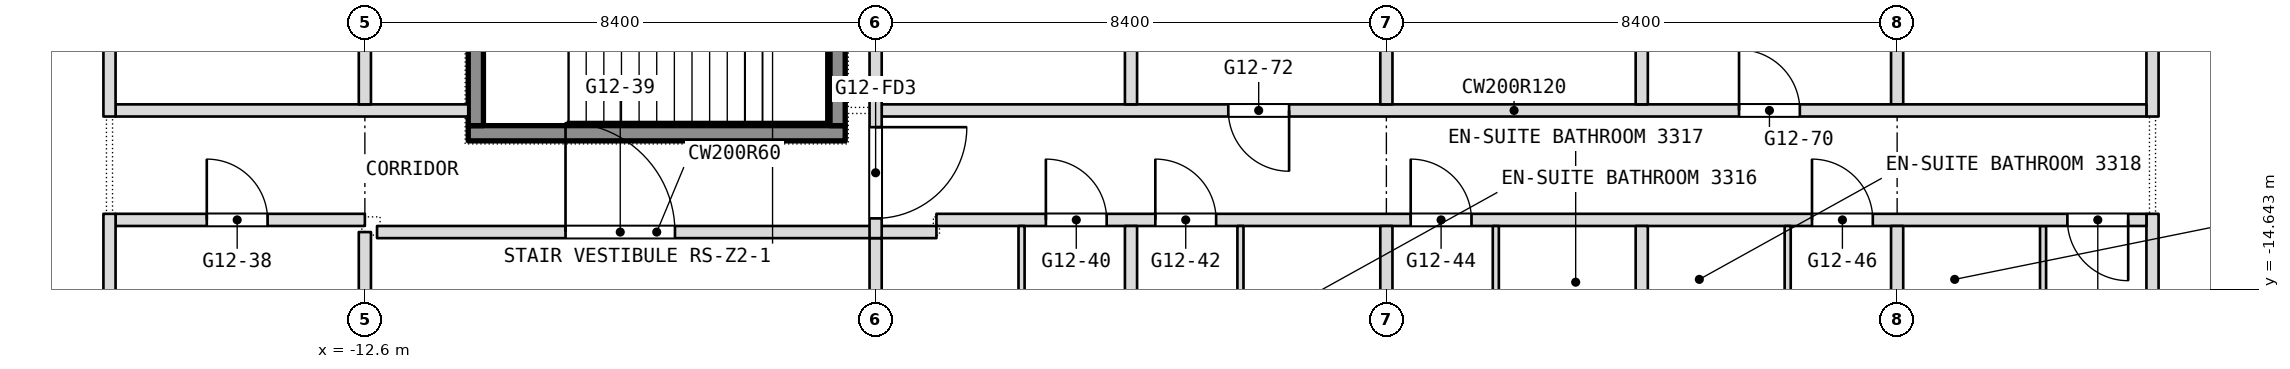
"""IFC4 building model, lengths in metres.
Left out: names, types, materials, properties, quantities, classifications, styles, units other than length and angle.
Written with IfcOpenShell. Run it as: python <this file> out.ifc"""

import sys

from ifc_helpers import new_model, si_unit, direction, frame, frame_2d, origin, place, context, subcontext, project, spatial, rectangle, extrude, element, fill, save


model = new_model("IFC4")
c1 = context("Model", 3, precision=1e-05, world=origin(), true_north=direction((0.0, 1.0)))
c2 = subcontext(c1, "Body", "Model", "MODEL_VIEW")
j1 = project(units=[si_unit("LENGTHUNIT", "METRE"), si_unit("PLANEANGLEUNIT", "RADIAN")], contexts=[c1])
p1 = place(None, origin())
s1 = spatial("IfcSite", under=j1, at=p1, CompositionType="ELEMENT")
p2 = place(p1, origin())
s2 = spatial("IfcBuilding", under=s1, at=p2, CompositionType="ELEMENT")
p3 = place(p2, frame((0.0, 0.0, 144.5)))
s3 = spatial("IfcBuildingStorey", under=s2, at=p3, CompositionType="ELEMENT", Elevation=144.5)
p4 = place(p3, frame((16.8, -22.186, 0.0), z_axis=(0.0, 0.0, 1.0), x_axis=(0.0, 1.0, 0.0)))
e1 = element("IfcWall", 1, at=p4, inside=s3, PredefinedType="PARTITIONING", context=c2, shape_type="SweptSolid", body=[
    extrude(rectangle(XDim=8.786, YDim=0.2, at=frame_2d((4.393, 0.0))), origin(), (0.0, 0.0, 1.0), 3.34),
])
p5 = place(p3, frame((16.8, -11.8, 0.0), z_axis=(0.0, 0.0, 1.0), x_axis=(0.0, 1.0, 0.0)))
e2 = element("IfcWall", 2, at=p5, inside=s3, PredefinedType="PARTITIONING", context=c2, shape_type="SweptSolid", body=[
    extrude(rectangle(XDim=9.9, YDim=0.2, at=frame_2d((4.95, 0.0))), origin(), (0.0, 0.0, 1.0), 3.34),
])
p6 = place(p3, frame((15.0, -16.25, 0.0), z_axis=(0.0, 0.0, 1.0), x_axis=(0.0, 1.0, 0.0)))
e3 = element("IfcWall", 3, at=p6, inside=s3, PredefinedType="PARTITIONING", context=c2, shape_type="SweptSolid", body=[
    extrude(rectangle(XDim=2.65, YDim=0.1, at=frame_2d((1.325, 0.0))), origin(), (0.0, 0.0, 1.0), 3.34),
])
p7 = place(p3, frame((-12.4, -13.7, 0.0), z_axis=(0.0, 0.0, 1.0), x_axis=(1.0, 0.0, 0.0)))
e4 = element("IfcWall", 4, at=p7, inside=s3, PredefinedType="PARTITIONING", context=c2, shape_type="SweptSolid", body=[
    extrude(rectangle(XDim=9.2, YDim=0.2, at=frame_2d((4.6, 0.0))), origin(), (0.0, 0.0, 1.0), 3.34),
])
p8 = place(p7, frame((3.1, 0.0, 0.0)))
e5 = element("IfcOpeningElement", 5, at=p8, cuts=e4, PredefinedType="OPENING", context=c2, shape_type="SweptSolid", body=[
    extrude(rectangle(XDim=1.8, YDim=2.1, at=frame_2d((0.9, 1.05))), frame((0.0, 0.1, 0.0), z_axis=(0.0, -1.0, 0.0), x_axis=(1.0, 0.0, 0.0)), (0.0, 0.0, 1.0), 0.2),
])
p9 = place(p3, frame((-16.7, -13.5, 0.0), z_axis=(0.0, 0.0, 1.0), x_axis=(1.0, 0.0, 0.0)))
e6 = element("IfcWall", 6, at=p9, inside=s3, PredefinedType="PARTITIONING", context=c2, shape_type="SweptSolid", body=[
    extrude(rectangle(XDim=4.1, YDim=0.2, at=frame_2d((2.05, 0.0))), origin(), (0.0, 0.0, 1.0), 3.34),
])
p10 = place(p9, frame((1.5, 0.0, 0.0)))
e7 = element("IfcOpeningElement", 7, at=p10, cuts=e6, PredefinedType="OPENING", context=c2, shape_type="SweptSolid", body=[
    extrude(rectangle(XDim=1.0, YDim=2.1, at=frame_2d((0.5, 1.05))), frame((0.0, 0.1, 0.0), z_axis=(0.0, -1.0, 0.0), x_axis=(1.0, 0.0, 0.0)), (0.0, 0.0, 1.0), 0.2),
])
p11 = place(p3, frame((-3.2, -13.5, 0.0), z_axis=(0.0, 0.0, 1.0), x_axis=(1.0, 0.0, 0.0)))
e8 = element("IfcWall", 8, at=p11, inside=s3, PredefinedType="PARTITIONING", context=c2, shape_type="SweptSolid", body=[
    extrude(rectangle(XDim=19.9, YDim=0.2, at=frame_2d((9.95, 0.0))), origin(), (0.0, 0.0, 1.0), 3.34),
])
p12 = place(p11, frame((1.8, 0.0, 0.0)))
e9 = element("IfcOpeningElement", 9, at=p12, cuts=e8, PredefinedType="OPENING", context=c2, shape_type="SweptSolid", body=[
    extrude(rectangle(XDim=1.0, YDim=2.1, at=frame_2d((0.5, 1.05))), frame((0.0, 0.1, 0.0), z_axis=(0.0, -1.0, 0.0), x_axis=(1.0, 0.0, 0.0)), (0.0, 0.0, 1.0), 0.2),
])
p13 = place(p11, frame((3.6, 0.0, 0.0)))
e10 = element("IfcOpeningElement", 10, at=p13, cuts=e8, PredefinedType="OPENING", context=c2, shape_type="SweptSolid", body=[
    extrude(rectangle(XDim=1.0, YDim=2.1, at=frame_2d((0.5, 1.05))), frame((0.0, 0.1, 0.0), z_axis=(0.0, -1.0, 0.0), x_axis=(1.0, 0.0, 0.0)), (0.0, 0.0, 1.0), 0.2),
])
p14 = place(p11, frame((7.8, 0.0, 0.0)))
e11 = element("IfcOpeningElement", 11, at=p14, cuts=e8, PredefinedType="OPENING", context=c2, shape_type="SweptSolid", body=[
    extrude(rectangle(XDim=1.0, YDim=2.1, at=frame_2d((0.5, 1.05))), frame((0.0, 0.1, 0.0), z_axis=(0.0, -1.0, 0.0), x_axis=(1.0, 0.0, 0.0)), (0.0, 0.0, 1.0), 0.2),
])
p15 = place(p11, frame((14.4, 0.0, 0.0)))
e12 = element("IfcOpeningElement", 12, at=p15, cuts=e8, PredefinedType="OPENING", context=c2, shape_type="SweptSolid", body=[
    extrude(rectangle(XDim=1.0, YDim=2.1, at=frame_2d((0.5, 1.05))), frame((0.0, 0.1, 0.0), z_axis=(0.0, -1.0, 0.0), x_axis=(1.0, 0.0, 0.0)), (0.0, 0.0, 1.0), 0.2),
])
p16 = place(p11, frame((18.6, 0.0, 0.0)))
e13 = element("IfcOpeningElement", 13, at=p16, cuts=e8, PredefinedType="OPENING", context=c2, shape_type="SweptSolid", body=[
    extrude(rectangle(XDim=1.0, YDim=2.1, at=frame_2d((0.5, 1.05))), frame((0.0, 0.1, 0.0), z_axis=(0.0, -1.0, 0.0), x_axis=(1.0, 0.0, 0.0)), (0.0, 0.0, 1.0), 0.2),
])
p17 = place(p3, frame((12.6, -21.175, 0.0), z_axis=(0.0, 0.0, 1.0), x_axis=(0.0, 1.0, 0.0)))
e14 = element("IfcWall", 14, at=p17, inside=s3, PredefinedType="PARTITIONING", context=c2, shape_type="SweptSolid", body=[
    extrude(rectangle(XDim=7.575, YDim=0.2, at=frame_2d((3.788, 0.0))), origin(), (0.0, 0.0, 1.0), 3.34),
])
p18 = place(p3, frame((12.6, -11.6, 0.0), z_axis=(0.0, 0.0, 1.0), x_axis=(0.0, 1.0, 0.0)))
e15 = element("IfcWall", 15, at=p18, inside=s3, PredefinedType="PARTITIONING", context=c2, shape_type="SweptSolid", body=[
    extrude(rectangle(XDim=3.9, YDim=0.2, at=frame_2d((1.95, 0.0))), origin(), (0.0, 0.0, 1.0), 3.34),
])
p19 = place(p3, frame((-16.7, -11.7, 0.0), z_axis=(0.0, 0.0, 1.0), x_axis=(1.0, 0.0, 0.0)))
e16 = element("IfcWall", 16, at=p19, inside=s3, PredefinedType="PARTITIONING", context=c2, shape_type="SweptSolid", body=[
    extrude(rectangle(XDim=5.8, YDim=0.2, at=frame_2d((2.9, 0.0))), origin(), (0.0, 0.0, 1.0), 3.34),
])
p20 = place(p3, frame((-4.1, -11.7, 0.0), z_axis=(0.0, 0.0, 1.0), x_axis=(1.0, 0.0, 0.0)))
e17 = element("IfcWall", 17, at=p20, inside=s3, PredefinedType="PARTITIONING", context=c2, shape_type="SweptSolid", body=[
    extrude(rectangle(XDim=20.8, YDim=0.2, at=frame_2d((10.4, 0.0))), origin(), (0.0, 0.0, 1.0), 3.34),
])
p21 = place(p20, frame((14.1, 0.0, 0.0)))
e18 = element("IfcOpeningElement", 18, at=p21, cuts=e17, PredefinedType="OPENING", context=c2, shape_type="SweptSolid", body=[
    extrude(rectangle(XDim=1.0, YDim=2.1, at=frame_2d((0.5, 1.05))), frame((0.0, 0.1, 0.0), z_axis=(0.0, -1.0, 0.0), x_axis=(1.0, 0.0, 0.0)), (0.0, 0.0, 1.0), 0.2),
])
p22 = place(p20, frame((5.7, 0.0, 0.0)))
e19 = element("IfcOpeningElement", 19, at=p22, cuts=e17, PredefinedType="OPENING", context=c2, shape_type="SweptSolid", body=[
    extrude(rectangle(XDim=1.0, YDim=2.1, at=frame_2d((0.5, 1.05))), frame((0.0, 0.1, 0.0), z_axis=(0.0, -1.0, 0.0), x_axis=(1.0, 0.0, 0.0)), (0.0, 0.0, 1.0), 0.2),
])
p23 = place(p3, frame((10.8, -16.25, 0.0), z_axis=(0.0, 0.0, 1.0), x_axis=(0.0, 1.0, 0.0)))
e20 = element("IfcWall", 20, at=p23, inside=s3, PredefinedType="PARTITIONING", context=c2, shape_type="SweptSolid", body=[
    extrude(rectangle(XDim=2.65, YDim=0.1, at=frame_2d((1.325, 0.0))), origin(), (0.0, 0.0, 1.0), 3.34),
])
p24 = place(p3, frame((8.4, -23.3, 0.0), z_axis=(0.0, 0.0, 1.0), x_axis=(0.0, 1.0, 0.0)))
e21 = element("IfcWall", 21, at=p24, inside=s3, PredefinedType="PARTITIONING", context=c2, shape_type="SweptSolid", body=[
    extrude(rectangle(XDim=9.7, YDim=0.2, at=frame_2d((4.85, 0.0))), origin(), (0.0, 0.0, 1.0), 3.34),
])
p25 = place(p3, frame((8.4, -11.6, 0.0), z_axis=(0.0, 0.0, 1.0), x_axis=(0.0, 1.0, 0.0)))
e22 = element("IfcWall", 22, at=p25, inside=s3, PredefinedType="PARTITIONING", context=c2, shape_type="SweptSolid", body=[
    extrude(rectangle(XDim=3.8, YDim=0.2, at=frame_2d((1.9, 0.0))), origin(), (0.0, 0.0, 1.0), 3.34),
])
p26 = place(p3, frame((6.0, -16.55, 0.0), z_axis=(0.0, 0.0, 1.0), x_axis=(0.0, 1.0, 0.0)))
e23 = element("IfcWall", 23, at=p26, inside=s3, PredefinedType="PARTITIONING", context=c2, shape_type="SweptSolid", body=[
    extrude(rectangle(XDim=2.95, YDim=0.1, at=frame_2d((1.475, 0.0))), origin(), (0.0, 0.0, 1.0), 3.34),
])
p27 = place(p3, frame((4.2, -23.3, 0.0), z_axis=(0.0, 0.0, 1.0), x_axis=(0.0, 1.0, 0.0)))
e24 = element("IfcWall", 24, at=p27, inside=s3, PredefinedType="PARTITIONING", context=c2, shape_type="SweptSolid", body=[
    extrude(rectangle(XDim=9.7, YDim=0.2, at=frame_2d((4.85, 0.0))), origin(), (0.0, 0.0, 1.0), 3.34),
])
p28 = place(p3, frame((4.2, -11.6, 0.0), z_axis=(0.0, 0.0, 1.0), x_axis=(0.0, 1.0, 0.0)))
e25 = element("IfcWall", 25, at=p28, inside=s3, PredefinedType="PARTITIONING", context=c2, shape_type="SweptSolid", body=[
    extrude(rectangle(XDim=9.7, YDim=0.2, at=frame_2d((4.85, 0.0))), origin(), (0.0, 0.0, 1.0), 3.34),
])
p29 = place(p3, frame((1.8, -16.95, 0.0), z_axis=(0.0, 0.0, 1.0), x_axis=(0.0, 1.0, 0.0)))
e26 = element("IfcWall", 26, at=p29, inside=s3, PredefinedType="PARTITIONING", context=c2, shape_type="SweptSolid", body=[
    extrude(rectangle(XDim=3.35, YDim=0.1, at=frame_2d((1.675, 0.0))), origin(), (0.0, 0.0, 1.0), 3.34),
])
p30 = place(p3, frame((0.0, -23.3, 0.0), z_axis=(0.0, 0.0, 1.0), x_axis=(0.0, 1.0, 0.0)))
e27 = element("IfcWall", 27, at=p30, inside=s3, PredefinedType="PARTITIONING", context=c2, shape_type="SweptSolid", body=[
    extrude(rectangle(XDim=9.7, YDim=0.2, at=frame_2d((4.85, 0.0))), origin(), (0.0, 0.0, 1.0), 3.34),
])
p31 = place(p3, frame((0.0, -11.6, 0.0), z_axis=(0.0, 0.0, 1.0), x_axis=(0.0, 1.0, 0.0)))
e28 = element("IfcWall", 28, at=p31, inside=s3, PredefinedType="PARTITIONING", context=c2, shape_type="SweptSolid", body=[
    extrude(rectangle(XDim=9.7, YDim=0.2, at=frame_2d((4.85, 0.0))), origin(), (0.0, 0.0, 1.0), 3.34),
])
p32 = place(p3, frame((-1.8, -17.65, 0.0), z_axis=(0.0, 0.0, 1.0), x_axis=(0.0, 1.0, 0.0)))
e29 = element("IfcWall", 29, at=p32, inside=s3, PredefinedType="PARTITIONING", context=c2, shape_type="SweptSolid", body=[
    extrude(rectangle(XDim=4.05, YDim=0.1, at=frame_2d((2.025, 0.0))), origin(), (0.0, 0.0, 1.0), 3.34),
])
p33 = place(p3, frame((-4.2, -23.3, 0.0), z_axis=(0.0, 0.0, 1.0), x_axis=(0.0, 1.0, 0.0)))
e30 = element("IfcWall", 30, at=p33, inside=s3, PredefinedType="PARTITIONING", context=c2, shape_type="SweptSolid", body=[
    extrude(rectangle(XDim=9.5, YDim=0.2, at=frame_2d((4.75, 0.0))), origin(), (0.0, 0.0, 1.0), 3.34),
])
p34 = place(p3, frame((-4.2, -13.8, 0.0), z_axis=(0.0, 0.0, 1.0), x_axis=(0.0, 1.0, 0.0)))
e31 = element("IfcWall", 31, at=p34, inside=s3, PredefinedType="PARTITIONING", context=c2, shape_type="SweptSolid", body=[
    extrude(rectangle(XDim=13.8, YDim=0.2, at=frame_2d((6.9, 0.0))), origin(), (0.0, 0.0, 1.0), 3.34),
])
p35 = place(p34, frame((12.15, 0.0, 0.0)))
e32 = element("IfcOpeningElement", 32, at=p35, cuts=e31, PredefinedType="OPENING", context=c2, shape_type="SweptSolid", body=[
    extrude(rectangle(XDim=1.5, YDim=2.1, at=frame_2d((0.75, 1.05))), frame((0.0, 0.1, 0.0), z_axis=(0.0, -1.0, 0.0), x_axis=(1.0, 0.0, 0.0)), (0.0, 0.0, 1.0), 0.2),
])
p36 = place(p34, frame((0.325, 0.0, 0.0)))
e33 = element("IfcOpeningElement", 33, at=p36, cuts=e31, PredefinedType="OPENING", context=c2, shape_type="SweptSolid", body=[
    extrude(rectangle(XDim=1.5, YDim=2.1, at=frame_2d((0.75, 1.05))), frame((0.0, 0.1, 0.0), z_axis=(0.0, -1.0, 0.0), x_axis=(1.0, 0.0, 0.0)), (0.0, 0.0, 1.0), 0.2),
])
p37 = place(p3, frame((-12.6, -21.175, 0.0), z_axis=(0.0, 0.0, 1.0), x_axis=(0.0, 1.0, 0.0)))
e34 = element("IfcWall", 34, at=p37, inside=s3, PredefinedType="PARTITIONING", context=c2, shape_type="SweptSolid", body=[
    extrude(rectangle(XDim=7.475, YDim=0.2, at=frame_2d((3.738, 0.0))), origin(), (0.0, 0.0, 1.0), 3.34),
])
p38 = place(p3, frame((-12.6, -11.6, 0.0), z_axis=(0.0, 0.0, 1.0), x_axis=(0.0, 1.0, 0.0)))
e35 = element("IfcWall", 35, at=p38, inside=s3, PredefinedType="PARTITIONING", context=c2, shape_type="SweptSolid", body=[
    extrude(rectangle(XDim=9.7, YDim=0.2, at=frame_2d((4.85, 0.0))), origin(), (0.0, 0.0, 1.0), 3.34),
])
p39 = place(p3, frame((-16.8, -22.186, 0.0), z_axis=(0.0, 0.0, 1.0), x_axis=(0.0, 1.0, 0.0)))
e36 = element("IfcWall", 36, at=p39, inside=s3, PredefinedType="PARTITIONING", context=c2, shape_type="SweptSolid", body=[
    extrude(rectangle(XDim=8.786, YDim=0.2, at=frame_2d((4.393, 0.0))), origin(), (0.0, 0.0, 1.0), 3.34),
])
p40 = place(p3, frame((-16.8, -11.8, 0.0), z_axis=(0.0, 0.0, 1.0), x_axis=(0.0, 1.0, 0.0)))
e37 = element("IfcWall", 37, at=p40, inside=s3, PredefinedType="PARTITIONING", context=c2, shape_type="SweptSolid", body=[
    extrude(rectangle(XDim=9.9, YDim=0.2, at=frame_2d((4.95, 0.0))), origin(), (0.0, 0.0, 1.0), 3.34),
])
p41 = place(p3, frame((-10.9, -12.075, 0.1), z_axis=(0.0, 0.0, 1.0), x_axis=(1.0, 0.0, 0.0)))
e38 = element("IfcWall", 38, at=p41, inside=s3, PredefinedType="SHEAR", context=c2, shape_type="SweptSolid", body=[
    extrude(rectangle(XDim=6.2, YDim=0.25, at=frame_2d((3.1, 0.0))), origin(), (0.0, 0.0, 1.0), 3.6),
])
for number, where, z_axis, x_axis in (
    (39, (-10.775, -11.95, 0.1), (0.0, 0.0, 1.0), (0.0, 1.0, 0.0)),
    (40, (-4.825, -11.95, 0.1), (0.0, 0.0, 1.0), (0.0, 1.0, 0.0)),
):
    element("IfcWall", number, at=place(p3, frame(where, z_axis=z_axis, x_axis=x_axis)), inside=s3, PredefinedType="SHEAR", context=c2, shape_type="SweptSolid", body=[
        extrude(rectangle(XDim=2.9, YDim=0.25, at=frame_2d((1.45, 0.0))), origin(), (0.0, 0.0, 1.0), 3.6),
    ])
p42 = place(p8, origin())
e41 = element("IfcDoor", 41, at=p42, inside=s3, OperationType="DOUBLE_DOOR_SINGLE_SWING", PredefinedType="DOOR", context=c2, shape_type="SweptSolid", body=[
    extrude(rectangle(XDim=1.8, YDim=2.1, at=frame_2d((0.9, 1.05))), frame((0.0, 0.025, 0.0), z_axis=(0.0, -1.0, 0.0), x_axis=(1.0, 0.0, 0.0)), (0.0, 0.0, 1.0), 0.05),
])
fill(e5, e41)
p43 = place(p10, origin())
e42 = element("IfcDoor", 42, at=p43, inside=s3, OperationType="SINGLE_SWING_LEFT", PredefinedType="DOOR", context=c2, shape_type="SweptSolid", body=[
    extrude(rectangle(XDim=1.0, YDim=2.1, at=frame_2d((0.5, 1.05))), frame((0.0, 0.025, 0.0), z_axis=(0.0, -1.0, 0.0), x_axis=(1.0, 0.0, 0.0)), (0.0, 0.0, 1.0), 0.05),
])
fill(e7, e42)
p44 = place(p12, origin())
e43 = element("IfcDoor", 43, at=p44, inside=s3, OperationType="SINGLE_SWING_RIGHT", PredefinedType="DOOR", context=c2, shape_type="SweptSolid", body=[
    extrude(rectangle(XDim=1.0, YDim=2.1, at=frame_2d((0.5, 1.05))), frame((0.0, 0.025, 0.0), z_axis=(0.0, -1.0, 0.0), x_axis=(1.0, 0.0, 0.0)), (0.0, 0.0, 1.0), 0.05),
])
fill(e9, e43)
p45 = place(p13, origin())
e44 = element("IfcDoor", 44, at=p45, inside=s3, OperationType="SINGLE_SWING_RIGHT", PredefinedType="DOOR", context=c2, shape_type="SweptSolid", body=[
    extrude(rectangle(XDim=1.0, YDim=2.1, at=frame_2d((0.5, 1.05))), frame((0.0, 0.025, 0.0), z_axis=(0.0, -1.0, 0.0), x_axis=(1.0, 0.0, 0.0)), (0.0, 0.0, 1.0), 0.05),
])
fill(e10, e44)
p46 = place(p14, origin())
e45 = element("IfcDoor", 45, at=p46, inside=s3, OperationType="SINGLE_SWING_RIGHT", PredefinedType="DOOR", context=c2, shape_type="SweptSolid", body=[
    extrude(rectangle(XDim=1.0, YDim=2.1, at=frame_2d((0.5, 1.05))), frame((0.0, 0.025, 0.0), z_axis=(0.0, -1.0, 0.0), x_axis=(1.0, 0.0, 0.0)), (0.0, 0.0, 1.0), 0.05),
])
fill(e11, e45)
p47 = place(p15, origin())
e46 = element("IfcDoor", 46, at=p47, inside=s3, OperationType="SINGLE_SWING_RIGHT", PredefinedType="DOOR", context=c2, shape_type="SweptSolid", body=[
    extrude(rectangle(XDim=1.0, YDim=2.1, at=frame_2d((0.5, 1.05))), frame((0.0, 0.025, 0.0), z_axis=(0.0, -1.0, 0.0), x_axis=(1.0, 0.0, 0.0)), (0.0, 0.0, 1.0), 0.05),
])
fill(e12, e46)
p48 = place(p16, origin())
e47 = element("IfcDoor", 47, at=p48, inside=s3, OperationType="SINGLE_SWING_LEFT", PredefinedType="DOOR", context=c2, shape_type="SweptSolid", body=[
    extrude(rectangle(XDim=1.0, YDim=2.1, at=frame_2d((0.5, 1.05))), frame((0.0, 0.025, 0.0), z_axis=(0.0, -1.0, 0.0), x_axis=(1.0, 0.0, 0.0)), (0.0, 0.0, 1.0), 0.05),
])
fill(e13, e47)
p49 = place(p21, origin())
e48 = element("IfcDoor", 48, at=p49, inside=s3, OperationType="SINGLE_SWING_RIGHT", PredefinedType="DOOR", context=c2, shape_type="SweptSolid", body=[
    extrude(rectangle(XDim=1.0, YDim=2.1, at=frame_2d((0.5, 1.05))), frame((0.0, 0.025, 0.0), z_axis=(0.0, -1.0, 0.0), x_axis=(1.0, 0.0, 0.0)), (0.0, 0.0, 1.0), 0.05),
])
fill(e18, e48)
p50 = place(p22, origin())
e49 = element("IfcDoor", 49, at=p50, inside=s3, OperationType="SINGLE_SWING_RIGHT", PredefinedType="DOOR", context=c2, shape_type="SweptSolid", body=[
    extrude(rectangle(XDim=1.0, YDim=2.1, at=frame_2d((0.5, 1.05))), frame((0.0, 0.025, 0.0), z_axis=(0.0, -1.0, 0.0), x_axis=(1.0, 0.0, 0.0)), (0.0, 0.0, 1.0), 0.05),
])
fill(e19, e49)
p51 = place(p36, origin())
e50 = element("IfcDoor", 50, at=p51, inside=s3, OperationType="DOUBLE_DOOR_DOUBLE_SWING", PredefinedType="DOOR", context=c2, shape_type="SweptSolid", body=[
    extrude(rectangle(XDim=1.5, YDim=2.1, at=frame_2d((0.75, 1.05))), frame((0.0, 0.025, 0.0), z_axis=(0.0, -1.0, 0.0), x_axis=(1.0, 0.0, 0.0)), (0.0, 0.0, 1.0), 0.05),
])
fill(e33, e50)
save(model, sys.argv[1])
